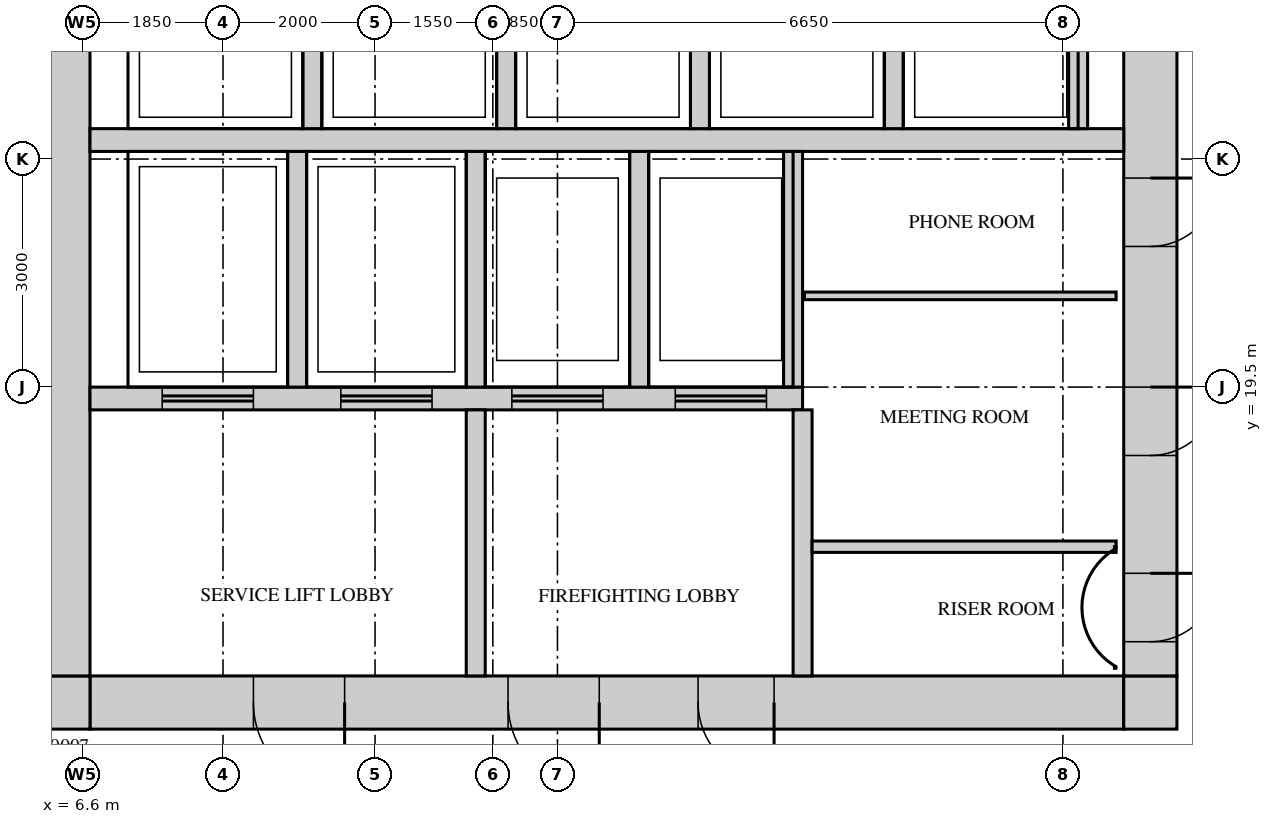
"""IFC4 building model, lengths in metres.
Left out: names, types, materials, properties, quantities, classifications, styles, units other than length and angle.
Written with IfcOpenShell. Run it as: python <this file> out.ifc"""

import sys

from ifc_helpers import new_model, si_unit, direction, frame, frame_2d, origin, place, context, subcontext, project, spatial, rectangle, extrude, source, transform, mapped, element, fill, save


model = new_model("IFC4")
c1 = context("Model", 3, precision=1e-05, world=origin(), true_north=direction((0.0, 1.0)))
c2 = subcontext(c1, "Body", "Model", "MODEL_VIEW")
j1 = project(units=[si_unit("LENGTHUNIT", "METRE"), si_unit("PLANEANGLEUNIT", "RADIAN")], contexts=[c1])
p1 = place(None, origin())
s1 = spatial("IfcSite", under=j1, at=p1, CompositionType="ELEMENT")
p2 = place(p1, origin())
s2 = spatial("IfcBuilding", under=s1, at=p2, CompositionType="ELEMENT")
p3 = place(p2, frame((0.0, 0.0, 254.2)))
s3 = spatial("IfcBuildingStorey", under=s2, at=p3, CompositionType="ELEMENT", Elevation=254.2)
m1 = source(origin(), c2, "Body", "SweptSolid", [
    extrude(rectangle(XDim=13.6, YDim=0.7, at=frame_2d((6.8, 0.0))), origin(), (0.0, 0.0, 1.0), 3.75),
])
p4 = place(p3, frame((6.7, 15.35, 0.0), z_axis=(0.0, 0.0, 1.0), x_axis=(1.0, 0.0, 0.0)))
e1 = element("IfcWall", 1, at=p4, inside=s3, PredefinedType="SHEAR", context=c2, shape_type="MappedRepresentation", body=[
    mapped(m1, transform((0.0, 0.0, 0.0))),
])
m2 = source(origin(), c2, "Body", "SweptSolid", [
    extrude(rectangle(XDim=1.2, YDim=2.1, at=frame_2d((0.6, 1.05))), frame((0.0, 0.36, 0.0), z_axis=(0.0, -1.0, 0.0), x_axis=(1.0, 0.0, 0.0)), (0.0, 0.0, 1.0), 0.72),
])
p5 = place(p4, frame((5.5, 0.0, 0.0)))
e2 = element("IfcOpeningElement", 2, at=p5, cuts=e1, PredefinedType="OPENING", context=c2, shape_type="MappedRepresentation", body=[
    mapped(m2, transform((0.0, 0.0, 0.0))),
])
p6 = place(p4, frame((2.15, 0.0, 0.0)))
e3 = element("IfcOpeningElement", 3, at=p6, cuts=e1, PredefinedType="OPENING", context=c2, shape_type="MappedRepresentation", body=[
    mapped(m2, transform((0.0, 0.0, 0.0))),
])
m3 = source(origin(), c2, "Body", "SweptSolid", [
    extrude(rectangle(XDim=1.0, YDim=2.1, at=frame_2d((0.5, 1.05))), frame((0.0, 0.36, 0.0), z_axis=(0.0, -1.0, 0.0), x_axis=(1.0, 0.0, 0.0)), (0.0, 0.0, 1.0), 0.72),
])
p7 = place(p4, frame((8.0, 0.0, 0.0)))
e4 = element("IfcOpeningElement", 4, at=p7, cuts=e1, PredefinedType="OPENING", context=c2, shape_type="MappedRepresentation", body=[
    mapped(m3, transform((0.0, 0.0, 0.0))),
])
m4 = source(origin(), c2, "Body", "SweptSolid", [
    extrude(rectangle(XDim=0.7, YDim=0.7, at=frame_2d((0.35, 0.0))), origin(), (0.0, 0.0, 1.0), 3.75),
])
for number, where, z_axis, x_axis in (
    (5, (20.3, 15.35, 0.0), (0.0, 0.0, 1.0), (1.0, 0.0, 0.0)),
    (6, (6.0, 15.35, 0.0), (0.0, 0.0, 1.0), (1.0, 0.0, 0.0)),
):
    element("IfcWall", number, at=place(p3, frame(where, z_axis=z_axis, x_axis=x_axis)), inside=s3, PredefinedType="SHEAR", context=c2, shape_type="MappedRepresentation", body=[
        mapped(m4, transform((0.0, 0.0, 0.0))),
    ])
m5 = source(origin(), c2, "Body", "SweptSolid", [
    extrude(rectangle(XDim=22.6, YDim=0.7, at=frame_2d((11.3, 0.0))), origin(), (0.0, 0.0, 1.0), 3.75),
])
p8 = place(p3, frame((20.65, 15.7, 0.0), z_axis=(0.0, 0.0, 1.0), x_axis=(0.0, 1.0, 0.0)))
e7 = element("IfcWall", 7, at=p8, inside=s3, PredefinedType="SHEAR", context=c2, shape_type="MappedRepresentation", body=[
    mapped(m5, transform((0.0, 0.0, 0.0))),
])
m6 = source(origin(), c2, "Body", "SweptSolid", [
    extrude(rectangle(XDim=1.8, YDim=2.1, at=frame_2d((0.9, 1.05))), frame((0.0, 0.36, 0.0), z_axis=(0.0, -1.0, 0.0), x_axis=(1.0, 0.0, 0.0)), (0.0, 0.0, 1.0), 0.72),
])
p9 = place(p8, frame((10.8, 0.0, 0.0)))
e8 = element("IfcOpeningElement", 8, at=p9, cuts=e7, PredefinedType="OPENING", context=c2, shape_type="MappedRepresentation", body=[
    mapped(m6, transform((0.0, 0.0, 0.0))),
])
m7 = source(origin(), c2, "Body", "SweptSolid", [
    extrude(rectangle(XDim=0.9, YDim=2.1, at=frame_2d((0.45, 1.05))), frame((0.0, 0.36, 0.0), z_axis=(0.0, -1.0, 0.0), x_axis=(1.0, 0.0, 0.0)), (0.0, 0.0, 1.0), 0.72),
])
p10 = place(p8, frame((0.45, 0.0, 0.0)))
e9 = element("IfcOpeningElement", 9, at=p10, cuts=e7, PredefinedType="OPENING", context=c2, shape_type="MappedRepresentation", body=[
    mapped(m7, transform((0.0, 0.0, 0.0))),
])
p11 = place(p8, frame((2.9, 0.0, 0.0)))
e10 = element("IfcOpeningElement", 10, at=p11, cuts=e7, PredefinedType="OPENING", context=c2, shape_type="MappedRepresentation", body=[
    mapped(m7, transform((0.0, 0.0, 0.0))),
])
p12 = place(p8, frame((5.65, 0.0, 0.0)))
e11 = element("IfcOpeningElement", 11, at=p12, cuts=e7, PredefinedType="OPENING", context=c2, shape_type="MappedRepresentation", body=[
    mapped(m7, transform((0.0, 0.0, 0.0))),
])
p13 = place(p3, frame((6.35, 15.7, 0.0), z_axis=(0.0, 0.0, 1.0), x_axis=(0.0, 1.0, 0.0)))
e12 = element("IfcWall", 12, at=p13, inside=s3, PredefinedType="SHEAR", context=c2, shape_type="MappedRepresentation", body=[
    mapped(m5, transform((0.0, 0.0, 0.0))),
])
m8 = source(origin(), c2, "Body", "SweptSolid", [
    extrude(rectangle(XDim=13.6, YDim=0.3, at=frame_2d((6.8, 0.0))), origin(), (0.0, 0.0, 1.0), 3.75),
])
p14 = place(p3, frame((6.7, 22.75, 0.0), z_axis=(0.0, 0.0, 1.0), x_axis=(1.0, 0.0, 0.0)))
e13 = element("IfcWall", 13, at=p14, inside=s3, PredefinedType="STANDARD", context=c2, shape_type="MappedRepresentation", body=[
    mapped(m8, transform((0.0, 0.0, 0.0))),
])
m9 = source(origin(), c2, "Body", "SweptSolid", [
    extrude(rectangle(XDim=9.375, YDim=0.3, at=frame_2d((4.688, 0.0))), origin(), (0.0, 0.0, 1.0), 3.75),
])
p15 = place(p3, frame((6.7, 19.35, 0.0), z_axis=(0.0, 0.0, 1.0), x_axis=(1.0, 0.0, 0.0)))
e14 = element("IfcWall", 14, at=p15, inside=s3, PredefinedType="STANDARD", context=c2, shape_type="MappedRepresentation", body=[
    mapped(m9, transform((0.0, 0.0, 0.0))),
])
m10 = source(origin(), c2, "Body", "SweptSolid", [
    extrude(rectangle(XDim=1.2, YDim=2.1, at=frame_2d((0.6, 1.05))), frame((0.0, 0.16, 0.0), z_axis=(0.0, -1.0, 0.0), x_axis=(1.0, 0.0, 0.0)), (0.0, 0.0, 1.0), 0.32),
])
p16 = place(p15, frame((0.95, 0.0, 0.0)))
e15 = element("IfcOpeningElement", 15, at=p16, cuts=e14, PredefinedType="OPENING", context=c2, shape_type="MappedRepresentation", body=[
    mapped(m10, transform((0.0, 0.0, 0.0))),
])
p17 = place(p15, frame((3.3, 0.0, 0.0)))
e16 = element("IfcOpeningElement", 16, at=p17, cuts=e14, PredefinedType="OPENING", context=c2, shape_type="MappedRepresentation", body=[
    mapped(m10, transform((0.0, 0.0, 0.0))),
])
p18 = place(p15, frame((5.55, 0.0, 0.0)))
e17 = element("IfcOpeningElement", 17, at=p18, cuts=e14, PredefinedType="OPENING", context=c2, shape_type="MappedRepresentation", body=[
    mapped(m10, transform((0.0, 0.0, 0.0))),
])
p19 = place(p15, frame((7.7, 0.0, 0.0)))
e18 = element("IfcOpeningElement", 18, at=p19, cuts=e14, PredefinedType="OPENING", context=c2, shape_type="MappedRepresentation", body=[
    mapped(m10, transform((0.0, 0.0, 0.0))),
])
m11 = source(origin(), c2, "Body", "SweptSolid", [
    extrude(rectangle(XDim=3.1, YDim=0.25, at=frame_2d((1.55, 0.0))), origin(), (0.0, 0.0, 1.0), 3.75),
])
for number, where, z_axis, x_axis in (
    (19, (9.425, 19.5, 0.0), (0.0, 0.0, 1.0), (0.0, 1.0, 0.0)),
    (20, (11.775, 19.5, 0.0), (0.0, 0.0, 1.0), (0.0, 1.0, 0.0)),
    (21, (13.925, 19.5, 0.0), (0.0, 0.0, 1.0), (0.0, 1.0, 0.0)),
    (22, (15.95, 19.5, 0.0), (0.0, 0.0, 1.0), (0.0, 1.0, 0.0)),
):
    element("IfcWall", number, at=place(p3, frame(where, z_axis=z_axis, x_axis=x_axis)), inside=s3, PredefinedType="STANDARD", context=c2, shape_type="MappedRepresentation", body=[
        mapped(m11, transform((0.0, 0.0, 0.0))),
    ])
m12 = source(origin(), c2, "Body", "SweptSolid", [
    extrude(rectangle(XDim=2.4, YDim=0.25, at=frame_2d((1.2, 0.0))), origin(), (0.0, 0.0, 1.0), 3.75),
])
for number, where, z_axis, x_axis in (
    (23, (17.275, 22.9, 0.0), (0.0, 0.0, 1.0), (0.0, 1.0, 0.0)),
    (24, (19.7, 22.9, 0.0), (0.0, 0.0, 1.0), (0.0, 1.0, 0.0)),
    (25, (9.625, 22.9, 0.0), (0.0, 0.0, 1.0), (0.0, 1.0, 0.0)),
    (26, (12.175, 22.9, 0.0), (0.0, 0.0, 1.0), (0.0, 1.0, 0.0)),
    (27, (14.725, 22.9, 0.0), (0.0, 0.0, 1.0), (0.0, 1.0, 0.0)),
):
    element("IfcWall", number, at=place(p3, frame(where, z_axis=z_axis, x_axis=x_axis)), inside=s3, PredefinedType="STANDARD", context=c2, shape_type="MappedRepresentation", body=[
        mapped(m12, transform((0.0, 0.0, 0.0))),
    ])
m13 = source(origin(), c2, "Body", "SweptSolid", [
    extrude(rectangle(XDim=3.5, YDim=0.25, at=frame_2d((1.75, 0.0))), origin(), (0.0, 0.0, 1.0), 3.75),
])
for number, where, z_axis, x_axis in (
    (28, (16.075, 15.7, 0.0), (0.0, 0.0, 1.0), (0.0, 1.0, 0.0)),
    (29, (11.775, 15.7, 0.0), (0.0, 0.0, 1.0), (0.0, 1.0, 0.0)),
):
    element("IfcWall", number, at=place(p3, frame(where, z_axis=z_axis, x_axis=x_axis)), inside=s3, PredefinedType="STANDARD", context=c2, shape_type="MappedRepresentation", body=[
        mapped(m13, transform((0.0, 0.0, 0.0))),
    ])
m14 = source(origin(), c2, "Body", "SweptSolid", [
    extrude(rectangle(XDim=4.0, YDim=0.15, at=frame_2d((2.0, 0.0))), origin(), (0.0, 0.0, 1.0), 3.8),
])
p20 = place(p3, frame((16.2, 17.4, 0.0), z_axis=(0.0, 0.0, 1.0), x_axis=(1.0, 0.0, 0.0)))
e30 = element("IfcWall", 30, at=p20, inside=s3, PredefinedType="PARTITIONING", context=c2, shape_type="MappedRepresentation", body=[
    mapped(m14, transform((0.0, 0.0, 0.0))),
])
m15 = source(origin(), c2, "Body", "SweptSolid", [
    extrude(rectangle(XDim=4.1, YDim=0.1, at=frame_2d((2.05, 0.0))), origin(), (0.0, 0.0, 1.0), 3.8),
])
p21 = place(p3, frame((16.1, 20.7, 0.0), z_axis=(0.0, 0.0, 1.0), x_axis=(1.0, 0.0, 0.0)))
e31 = element("IfcWall", 31, at=p21, inside=s3, PredefinedType="PARTITIONING", context=c2, shape_type="MappedRepresentation", body=[
    mapped(m15, transform((0.0, 0.0, 0.0))),
])
m16 = source(origin(), c2, "Body", "SweptSolid", [
    extrude(rectangle(XDim=0.9, YDim=2.1, at=frame_2d((0.45, 1.05))), frame((0.0, 0.3, 0.0), z_axis=(0.0, -1.0, 0.0), x_axis=(1.0, 0.0, 0.0)), (0.0, 0.0, 1.0), 0.6),
])
p22 = place(p10, origin())
e32 = element("IfcDoor", 32, at=p22, inside=s3, OperationType="SINGLE_SWING_RIGHT", PredefinedType="DOOR", context=c2, shape_type="MappedRepresentation", body=[
    mapped(m16, transform((0.0, 0.0, 0.0))),
])
fill(e9, e32)
p23 = place(p11, origin())
e33 = element("IfcDoor", 33, at=p23, inside=s3, OperationType="SINGLE_SWING_RIGHT", PredefinedType="DOOR", context=c2, shape_type="MappedRepresentation", body=[
    mapped(m16, transform((0.0, 0.0, 0.0))),
])
fill(e10, e33)
p24 = place(p12, origin())
e34 = element("IfcDoor", 34, at=p24, inside=s3, OperationType="SINGLE_SWING_RIGHT", PredefinedType="DOOR", context=c2, shape_type="MappedRepresentation", body=[
    mapped(m16, transform((0.0, 0.0, 0.0))),
])
fill(e11, e34)
m17 = source(origin(), c2, "Body", "SweptSolid", [
    extrude(rectangle(XDim=1.2, YDim=2.1, at=frame_2d((0.6, 1.05))), frame((0.0, 0.3, 0.0), z_axis=(0.0, -1.0, 0.0), x_axis=(1.0, 0.0, 0.0)), (0.0, 0.0, 1.0), 0.6),
])
p25 = place(p5, origin())
e35 = element("IfcDoor", 35, at=p25, inside=s3, OperationType="SINGLE_SWING_RIGHT", PredefinedType="DOOR", context=c2, shape_type="MappedRepresentation", body=[
    mapped(m17, transform((0.0, 0.0, 0.0))),
])
fill(e2, e35)
p26 = place(p6, origin())
e36 = element("IfcDoor", 36, at=p26, inside=s3, OperationType="SINGLE_SWING_RIGHT", PredefinedType="DOOR", context=c2, shape_type="MappedRepresentation", body=[
    mapped(m17, transform((0.0, 0.0, 0.0))),
])
fill(e3, e36)
m18 = source(origin(), c2, "Body", "SweptSolid", [
    extrude(rectangle(XDim=1.0, YDim=2.1, at=frame_2d((0.5, 1.05))), frame((0.0, 0.3, 0.0), z_axis=(0.0, -1.0, 0.0), x_axis=(1.0, 0.0, 0.0)), (0.0, 0.0, 1.0), 0.6),
])
p27 = place(p7, origin())
e37 = element("IfcDoor", 37, at=p27, inside=s3, OperationType="SINGLE_SWING_RIGHT", PredefinedType="DOOR", context=c2, shape_type="MappedRepresentation", body=[
    mapped(m18, transform((0.0, 0.0, 0.0))),
])
fill(e4, e37)
m19 = source(origin(), c2, "Body", "SweptSolid", [
    extrude(rectangle(XDim=1.2, YDim=2.1, at=frame_2d((0.6, 1.05))), frame((0.0, 0.025, 0.0), z_axis=(0.0, -1.0, 0.0), x_axis=(1.0, 0.0, 0.0)), (0.0, 0.0, 1.0), 0.05),
])
p28 = place(p16, origin())
e38 = element("IfcDoor", 38, at=p28, inside=s3, OperationType="DOUBLE_DOOR_SLIDING", PredefinedType="DOOR", context=c2, shape_type="MappedRepresentation", body=[
    mapped(m19, transform((0.0, 0.0, 0.0))),
])
fill(e15, e38)
p29 = place(p17, origin())
e39 = element("IfcDoor", 39, at=p29, inside=s3, OperationType="DOUBLE_DOOR_SLIDING", PredefinedType="DOOR", context=c2, shape_type="MappedRepresentation", body=[
    mapped(m19, transform((0.0, 0.0, 0.0))),
])
fill(e16, e39)
p30 = place(p18, origin())
e40 = element("IfcDoor", 40, at=p30, inside=s3, OperationType="DOUBLE_DOOR_SLIDING", PredefinedType="DOOR", context=c2, shape_type="MappedRepresentation", body=[
    mapped(m19, transform((0.0, 0.0, 0.0))),
])
fill(e17, e40)
p31 = place(p19, origin())
e41 = element("IfcDoor", 41, at=p31, inside=s3, OperationType="DOUBLE_DOOR_SLIDING", PredefinedType="DOOR", context=c2, shape_type="MappedRepresentation", body=[
    mapped(m19, transform((0.0, 0.0, 0.0))),
])
fill(e18, e41)
save(model, sys.argv[1])
